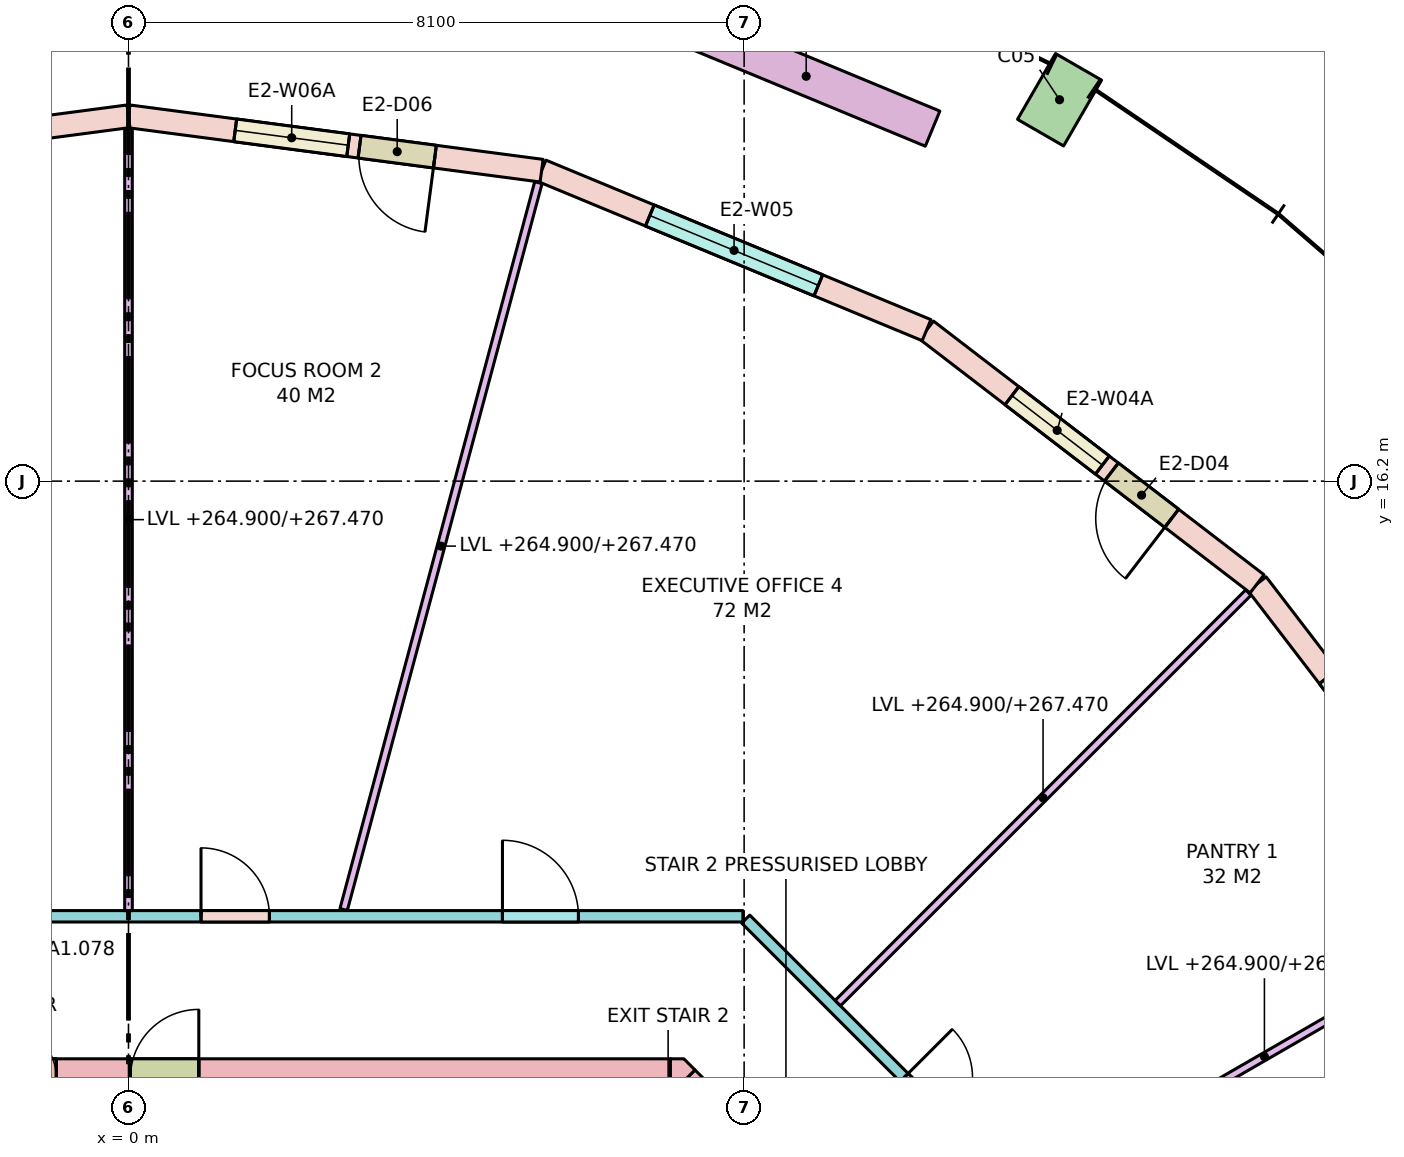
"""IFC4 building model, lengths in metres.
Left out: names, types, materials, properties, quantities, classifications, styles, units other than length and angle.
Written with IfcOpenShell. Run it as: python <this file> out.ifc"""

import sys

from ifc_helpers import new_model, si_unit, direction, frame, frame_2d, origin, origin_2d, place, context, subcontext, project, spatial, polyline, rectangle, outline, extrude, element, fill, save


model = new_model("IFC4")
c1 = context("Model", 3, precision=1e-05, world=origin(), true_north=direction((0.0, 1.0)))
c2 = subcontext(c1, "Body", "Model", "MODEL_VIEW")
j1 = project(units=[si_unit("LENGTHUNIT", "METRE"), si_unit("PLANEANGLEUNIT", "RADIAN")], contexts=[c1])
p1 = place(None, origin())
s1 = spatial("IfcSite", under=j1, at=p1, CompositionType="ELEMENT")
p2 = place(p1, origin())
s2 = spatial("IfcBuilding", under=s1, at=p2, CompositionType="ELEMENT")
p3 = place(p2, frame((0.0, 0.0, 264.9)))
s3 = spatial("IfcBuildingStorey", under=s2, at=p3, CompositionType="ELEMENT", Elevation=264.9)
p4 = place(p3, frame((12.25, 21.218, 0.0), z_axis=(0.0, 0.0, 1.0), x_axis=(-0.866025403784, 0.5, 0.0)))
e1 = element("IfcColumn", 1, at=p4, inside=s3, PredefinedType="COLUMN", context=c2, shape_type="SweptSolid", body=[
    extrude(rectangle(XDim=0.7, YDim=1.0, at=origin_2d()), origin(), (0.0, 0.0, 1.0), 3.7),
])
p5 = place(p3, frame((-7.13, 8.35, -0.28), z_axis=(0.0, 0.0, 1.0), x_axis=(1.0, 0.0, 0.0)))
e2 = element("IfcWall", 2, at=p5, inside=s3, PredefinedType="SHEAR", context=c2, shape_type="SweptSolid", body=[
    extrude(rectangle(XDim=14.26, YDim=0.5, at=frame_2d((7.13, 0.0))), origin(), (0.0, 0.0, 1.0), 3.7),
])
p6 = place(p5, frame((5.48, 0.0, 0.28)))
e3 = element("IfcOpeningElement", 3, at=p6, cuts=e2, PredefinedType="OPENING", context=c2, shape_type="SweptSolid", body=[
    extrude(rectangle(XDim=0.7, YDim=2.1, at=frame_2d((0.35, 1.05))), frame((0.0, 0.26, 0.0), z_axis=(0.0, -1.0, 0.0), x_axis=(1.0, 0.0, 0.0)), (0.0, 0.0, 1.0), 0.52),
])
p7 = place(p5, frame((7.155, 0.0, 0.28)))
e4 = element("IfcOpeningElement", 4, at=p7, cuts=e2, PredefinedType="OPENING", context=c2, shape_type="SweptSolid", body=[
    extrude(rectangle(XDim=0.9, YDim=2.1, at=frame_2d((0.45, 1.05))), frame((0.0, 0.26, 0.0), z_axis=(0.0, -1.0, 0.0), x_axis=(1.0, 0.0, 0.0)), (0.0, 0.0, 1.0), 0.52),
])
p8 = place(p3, frame((7.277, 8.277, -0.28), z_axis=(0.0, 0.0, 1.0), x_axis=(0.707106781187, -0.707106781187, 0.0)))
e5 = element("IfcWall", 5, at=p8, inside=s3, PredefinedType="SHEAR", context=c2, shape_type="SweptSolid", body=[
    extrude(rectangle(XDim=4.243, YDim=0.5, at=frame_2d((2.121, 0.0))), origin(), (0.0, 0.0, 1.0), 3.7),
])
p9 = place(p8, frame((2.393, 0.0, 0.28)))
e6 = element("IfcOpeningElement", 6, at=p9, cuts=e5, PredefinedType="OPENING", context=c2, shape_type="SweptSolid", body=[
    extrude(rectangle(XDim=1.2, YDim=2.1, at=frame_2d((0.6, 1.05))), frame((0.0, 0.26, 0.0), z_axis=(0.0, -1.0, 0.0), x_axis=(1.0, 0.0, 0.0)), (0.0, 0.0, 1.0), 0.52),
])
p10 = place(p3, frame((0.0, 0.0, -0.28)))
e7 = element("IfcWall", 7, at=p10, inside=s3, PredefinedType="SHEAR", context=c2, shape_type="SweptSolid", body=[
    extrude(outline(polyline([(7.307, 8.6), (7.454, 8.454), (7.13, 8.13), (7.13, 8.6), (7.307, 8.6)])), origin(), (0.0, 0.0, 1.0), 3.7),
])
p11 = place(p3, frame((18.187, 10.5, 0.0), z_axis=(0.0, 0.0, 1.0), x_axis=(-0.608784891166, 0.793335336593, 0.0)))
e8 = element("IfcWall", 8, at=p11, inside=s3, PredefinedType="STANDARD", context=c2, shape_type="SweptSolid", body=[
    extrude(rectangle(XDim=5.482, YDim=0.3, at=frame_2d((2.741, 0.0))), origin(), (0.0, 0.0, 1.0), 3.42),
])
p12 = place(p11, frame((1.541, 0.0, 0.8)))
e9 = element("IfcOpeningElement", 9, at=p12, cuts=e8, PredefinedType="OPENING", context=c2, shape_type="SweptSolid", body=[
    extrude(rectangle(XDim=2.4, YDim=2.4, at=frame_2d((1.2, 1.2))), frame((0.0, 0.16, 0.0), z_axis=(0.0, -1.0, 0.0), x_axis=(1.0, 0.0, 0.0)), (0.0, 0.0, 1.0), 0.32),
])
p13 = place(p3, frame((14.849, 14.849, 0.0), z_axis=(0.0, 0.0, 1.0), x_axis=(-0.793335336593, 0.608784891166, 0.0)))
e10 = element("IfcWall", 10, at=p13, inside=s3, PredefinedType="STANDARD", context=c2, shape_type="SweptSolid", body=[
    extrude(rectangle(XDim=5.482, YDim=0.3, at=frame_2d((2.741, 0.0))), origin(), (0.0, 0.0, 1.0), 3.42),
])
p14 = place(p13, frame((1.416, 0.0, 0.0)))
e11 = element("IfcOpeningElement", 11, at=p14, cuts=e10, PredefinedType="OPENING", context=c2, shape_type="SweptSolid", body=[
    extrude(rectangle(XDim=1.0, YDim=2.4, at=frame_2d((0.5, 1.2))), frame((0.0, 0.16, 0.0), z_axis=(0.0, -1.0, 0.0), x_axis=(1.0, 0.0, 0.0)), (0.0, 0.0, 1.0), 0.32),
])
p15 = place(p13, frame((2.566, 0.0, 0.8)))
e12 = element("IfcOpeningElement", 12, at=p15, cuts=e10, PredefinedType="OPENING", context=c2, shape_type="SweptSolid", body=[
    extrude(rectangle(XDim=1.5, YDim=2.4, at=frame_2d((0.75, 1.2))), frame((0.0, 0.16, 0.0), z_axis=(0.0, -1.0, 0.0), x_axis=(1.0, 0.0, 0.0)), (0.0, 0.0, 1.0), 0.32),
])
p16 = place(p3, frame((10.5, 18.187, 0.0), z_axis=(0.0, 0.0, 1.0), x_axis=(-0.923877333662, 0.382688740813, 0.0)))
e13 = element("IfcWall", 13, at=p16, inside=s3, PredefinedType="STANDARD", context=c2, shape_type="SweptSolid", body=[
    extrude(rectangle(XDim=5.482, YDim=0.3, at=frame_2d((2.741, 0.0))), origin(), (0.0, 0.0, 1.0), 3.42),
])
p17 = place(p16, frame((1.541, 0.0, 0.8)))
e14 = element("IfcOpeningElement", 14, at=p17, cuts=e13, PredefinedType="OPENING", context=c2, shape_type="SweptSolid", body=[
    extrude(rectangle(XDim=2.4, YDim=2.4, at=frame_2d((1.2, 1.2))), frame((0.0, 0.16, 0.0), z_axis=(0.0, -1.0, 0.0), x_axis=(1.0, 0.0, 0.0)), (0.0, 0.0, 1.0), 0.32),
])
p18 = place(p3, frame((5.435, 20.284, 0.0), z_axis=(0.0, 0.0, 1.0), x_axis=(-0.991444743541, 0.130527087244, 0.0)))
e15 = element("IfcWall", 15, at=p18, inside=s3, PredefinedType="STANDARD", context=c2, shape_type="SweptSolid", body=[
    extrude(rectangle(XDim=5.482, YDim=0.3, at=frame_2d((2.741, 0.0))), origin(), (0.0, 0.0, 1.0), 3.42),
])
p19 = place(p18, frame((1.416, 0.0, 0.0)))
e16 = element("IfcOpeningElement", 16, at=p19, cuts=e15, PredefinedType="OPENING", context=c2, shape_type="SweptSolid", body=[
    extrude(rectangle(XDim=1.0, YDim=2.4, at=frame_2d((0.5, 1.2))), frame((0.0, 0.16, 0.0), z_axis=(0.0, -1.0, 0.0), x_axis=(1.0, 0.0, 0.0)), (0.0, 0.0, 1.0), 0.32),
])
p20 = place(p18, frame((2.566, 0.0, 0.8)))
e17 = element("IfcOpeningElement", 17, at=p20, cuts=e15, PredefinedType="OPENING", context=c2, shape_type="SweptSolid", body=[
    extrude(rectangle(XDim=1.5, YDim=2.4, at=frame_2d((0.75, 1.2))), frame((0.0, 0.16, 0.0), z_axis=(0.0, -1.0, 0.0), x_axis=(1.0, 0.0, 0.0)), (0.0, 0.0, 1.0), 0.32),
])
p21 = place(p3, frame((0.0, 21.0, 0.0), z_axis=(0.0, 0.0, 1.0), x_axis=(-0.991444743541, -0.130527087244, 0.0)))
e18 = element("IfcWall", 18, at=p21, inside=s3, PredefinedType="STANDARD", context=c2, shape_type="SweptSolid", body=[
    extrude(rectangle(XDim=5.482, YDim=0.3, at=frame_2d((2.741, 0.0))), origin(), (0.0, 0.0, 1.0), 3.42),
])
p22 = place(p21, frame((1.541, 0.0, 0.8)))
e19 = element("IfcOpeningElement", 19, at=p22, cuts=e18, PredefinedType="OPENING", context=c2, shape_type="SweptSolid", body=[
    extrude(rectangle(XDim=2.4, YDim=2.4, at=frame_2d((1.2, 1.2))), frame((0.0, 0.16, 0.0), z_axis=(0.0, -1.0, 0.0), x_axis=(1.0, 0.0, 0.0)), (0.0, 0.0, 1.0), 0.32),
])
p23 = place(p3, frame((10.58, 20.838, 0.0), z_axis=(0.0, 0.0, 1.0), x_axis=(-0.923909393783, 0.382611332921, 0.0)))
e20 = element("IfcWall", 20, at=p23, inside=s3, PredefinedType="PARAPET", context=c2, shape_type="SweptSolid", body=[
    extrude(rectangle(XDim=3.6, YDim=0.5, at=frame_2d((1.8, 0.0))), origin(), (0.0, 0.0, 1.0), 0.9),
])
p24 = place(p3, frame((-8.084, 10.475, 0.0), z_axis=(0.0, 0.0, 1.0), x_axis=(1.0, 0.0, 0.0)))
e21 = element("IfcWall", 21, at=p24, inside=s3, PredefinedType="PARTITIONING", context=c2, shape_type="SweptSolid", body=[
    extrude(rectangle(XDim=16.167, YDim=0.15, at=frame_2d((8.084, 0.0))), origin(), (0.0, 0.0, 1.0), 2.57),
])
p25 = place(p24, frame((13.004, 0.0, 0.0)))
e22 = element("IfcOpeningElement", 22, at=p25, cuts=e21, PredefinedType="OPENING", context=c2, shape_type="SweptSolid", body=[
    extrude(rectangle(XDim=1.0, YDim=2.1, at=frame_2d((0.5, 1.05))), frame((0.0, 0.085, 0.0), z_axis=(0.0, -1.0, 0.0), x_axis=(1.0, 0.0, 0.0)), (0.0, 0.0, 1.0), 0.17),
])
p26 = place(p24, frame((9.038, 0.0, 0.0)))
e23 = element("IfcOpeningElement", 23, at=p26, cuts=e21, PredefinedType="OPENING", context=c2, shape_type="SweptSolid", body=[
    extrude(rectangle(XDim=0.9, YDim=2.1, at=frame_2d((0.45, 1.05))), frame((0.0, 0.085, 0.0), z_axis=(0.0, -1.0, 0.0), x_axis=(1.0, 0.0, 0.0)), (0.0, 0.0, 1.0), 0.17),
])
p27 = place(p24, frame((4.556, 0.0, 0.0)))
e24 = element("IfcOpeningElement", 24, at=p27, cuts=e21, PredefinedType="OPENING", context=c2, shape_type="SweptSolid", body=[
    extrude(rectangle(XDim=1.0, YDim=2.1, at=frame_2d((0.5, 1.05))), frame((0.0, 0.085, 0.0), z_axis=(0.0, -1.0, 0.0), x_axis=(1.0, 0.0, 0.0)), (0.0, 0.0, 1.0), 0.17),
])
p28 = place(p3, frame((8.121, 10.438, 0.0), z_axis=(0.0, 0.0, 1.0), x_axis=(0.707106781187, -0.707106781187, 0.0)))
e25 = element("IfcWall", 25, at=p28, inside=s3, PredefinedType="PARTITIONING", context=c2, shape_type="SweptSolid", body=[
    extrude(rectangle(XDim=6.105, YDim=0.15, at=frame_2d((3.053, 0.0))), origin(), (0.0, 0.0, 1.0), 2.57),
])
p29 = place(p28, frame((2.948, 0.0, 0.0)))
e26 = element("IfcOpeningElement", 26, at=p29, cuts=e25, PredefinedType="OPENING", context=c2, shape_type="SweptSolid", body=[
    extrude(rectangle(XDim=0.9, YDim=2.1, at=frame_2d((0.45, 1.05))), frame((0.0, 0.085, 0.0), z_axis=(0.0, -1.0, 0.0), x_axis=(1.0, 0.0, 0.0)), (0.0, 0.0, 1.0), 0.17),
])
p30 = place(p3, frame((11.846, 6.839, 0.0), z_axis=(0.0, 0.0, 1.0), x_axis=(0.866011787705, 0.500023583, 0.0)))
e27 = element("IfcWall", 27, at=p30, inside=s3, PredefinedType="PARTITIONING", context=c2, shape_type="SweptSolid", body=[
    extrude(rectangle(XDim=7.158, YDim=0.1, at=frame_2d((3.579, 0.0))), origin(), (0.0, 0.0, 1.0), 2.57),
])
p31 = place(p3, frame((9.333, 9.333, 0.0), z_axis=(0.0, 0.0, 1.0), x_axis=(0.707106781187, 0.707106781187, 0.0)))
e28 = element("IfcWall", 28, at=p31, inside=s3, PredefinedType="PARTITIONING", context=c2, shape_type="SweptSolid", body=[
    extrude(rectangle(XDim=7.639, YDim=0.1, at=frame_2d((3.819, 0.0))), origin(), (0.0, 0.0, 1.0), 2.57),
])
p32 = place(p3, frame((2.831, 10.564, 0.0), z_axis=(0.0, 0.0, 1.0), x_axis=(0.258795254151, 0.965932200741, 0.0)))
e29 = element("IfcWall", 29, at=p32, inside=s3, PredefinedType="PARTITIONING", context=c2, shape_type="SweptSolid", body=[
    extrude(rectangle(XDim=9.9, YDim=0.1, at=frame_2d((4.95, 0.0))), origin(), (0.0, 0.0, 1.0), 2.57),
])
p33 = place(p3, frame((0.0, 10.55, 0.0), z_axis=(0.0, 0.0, 1.0), x_axis=(0.0, 1.0, 0.0)))
e30 = element("IfcWall", 30, at=p33, inside=s3, PredefinedType="PARTITIONING", context=c2, shape_type="SweptSolid", body=[
    extrude(rectangle(XDim=10.287, YDim=0.1, at=frame_2d((5.143, 0.0))), origin(), (0.0, 0.0, 1.0), 2.57),
])
p34 = place(p14, origin())
e31 = element("IfcDoor", 31, at=p34, inside=s3, OperationType="SINGLE_SWING_LEFT", PredefinedType="DOOR", context=c2, shape_type="SweptSolid", body=[
    extrude(rectangle(XDim=1.0, YDim=2.4, at=frame_2d((0.5, 1.2))), frame((0.0, 0.025, 0.0), z_axis=(0.0, -1.0, 0.0), x_axis=(1.0, 0.0, 0.0)), (0.0, 0.0, 1.0), 0.05),
])
fill(e11, e31)
p35 = place(p15, origin())
e32 = element("IfcWindow", 32, at=p35, inside=s3, PartitioningType="SINGLE_PANEL", PredefinedType="WINDOW", context=c2, shape_type="SweptSolid", body=[
    extrude(rectangle(XDim=1.5, YDim=2.4, at=frame_2d((0.75, 1.2))), frame((0.0, 0.03, 0.0), z_axis=(0.0, -1.0, 0.0), x_axis=(1.0, 0.0, 0.0)), (0.0, 0.0, 1.0), 0.06),
])
fill(e12, e32)
p36 = place(p17, origin())
e33 = element("IfcWindow", 33, at=p36, inside=s3, PartitioningType="SINGLE_PANEL", PredefinedType="WINDOW", context=c2, shape_type="SweptSolid", body=[
    extrude(rectangle(XDim=2.4, YDim=2.4, at=frame_2d((1.2, 1.2))), frame((0.0, 0.03, 0.0), z_axis=(0.0, -1.0, 0.0), x_axis=(1.0, 0.0, 0.0)), (0.0, 0.0, 1.0), 0.06),
])
fill(e14, e33)
p37 = place(p19, origin())
e34 = element("IfcDoor", 34, at=p37, inside=s3, OperationType="SINGLE_SWING_LEFT", PredefinedType="DOOR", context=c2, shape_type="SweptSolid", body=[
    extrude(rectangle(XDim=1.0, YDim=2.4, at=frame_2d((0.5, 1.2))), frame((0.0, 0.025, 0.0), z_axis=(0.0, -1.0, 0.0), x_axis=(1.0, 0.0, 0.0)), (0.0, 0.0, 1.0), 0.05),
])
fill(e16, e34)
p38 = place(p20, origin())
e35 = element("IfcWindow", 35, at=p38, inside=s3, PartitioningType="SINGLE_PANEL", PredefinedType="WINDOW", context=c2, shape_type="SweptSolid", body=[
    extrude(rectangle(XDim=1.5, YDim=2.4, at=frame_2d((0.75, 1.2))), frame((0.0, 0.03, 0.0), z_axis=(0.0, -1.0, 0.0), x_axis=(1.0, 0.0, 0.0)), (0.0, 0.0, 1.0), 0.06),
])
fill(e17, e35)
p39 = place(p6, origin())
e36 = element("IfcDoor", 36, at=p39, inside=s3, OperationType="SINGLE_SWING_LEFT", PredefinedType="DOOR", context=c2, shape_type="SweptSolid", body=[
    extrude(rectangle(XDim=0.7, YDim=2.1, at=frame_2d((0.35, 1.05))), frame((0.0, 0.025, 0.0), z_axis=(0.0, -1.0, 0.0), x_axis=(1.0, 0.0, 0.0)), (0.0, 0.0, 1.0), 0.05),
])
fill(e3, e36)
p40 = place(p7, origin())
e37 = element("IfcDoor", 37, at=p40, inside=s3, OperationType="SINGLE_SWING_RIGHT", PredefinedType="DOOR", context=c2, shape_type="SweptSolid", body=[
    extrude(rectangle(XDim=0.9, YDim=2.1, at=frame_2d((0.45, 1.05))), frame((0.0, 0.025, 0.0), z_axis=(0.0, -1.0, 0.0), x_axis=(1.0, 0.0, 0.0)), (0.0, 0.0, 1.0), 0.05),
])
fill(e4, e37)
p41 = place(p29, origin())
e38 = element("IfcDoor", 38, at=p41, inside=s3, OperationType="SINGLE_SWING_LEFT", PredefinedType="DOOR", context=c2, shape_type="SweptSolid", body=[
    extrude(rectangle(XDim=0.9, YDim=2.1, at=frame_2d((0.45, 1.05))), frame((0.0, 0.025, 0.0), z_axis=(0.0, -1.0, 0.0), x_axis=(1.0, 0.0, 0.0)), (0.0, 0.0, 1.0), 0.05),
])
fill(e26, e38)
p42 = place(p25, origin())
e39 = element("IfcDoor", 39, at=p42, inside=s3, OperationType="SINGLE_SWING_LEFT", PredefinedType="DOOR", context=c2, shape_type="SweptSolid", body=[
    extrude(rectangle(XDim=1.0, YDim=2.1, at=frame_2d((0.5, 1.05))), frame((0.0, 0.025, 0.0), z_axis=(0.0, -1.0, 0.0), x_axis=(1.0, 0.0, 0.0)), (0.0, 0.0, 1.0), 0.05),
])
fill(e22, e39)
p43 = place(p26, origin())
e40 = element("IfcDoor", 40, at=p43, inside=s3, OperationType="SINGLE_SWING_LEFT", PredefinedType="DOOR", context=c2, shape_type="SweptSolid", body=[
    extrude(rectangle(XDim=0.9, YDim=2.1, at=frame_2d((0.45, 1.05))), frame((0.0, 0.025, 0.0), z_axis=(0.0, -1.0, 0.0), x_axis=(1.0, 0.0, 0.0)), (0.0, 0.0, 1.0), 0.05),
])
fill(e23, e40)
save(model, sys.argv[1])
